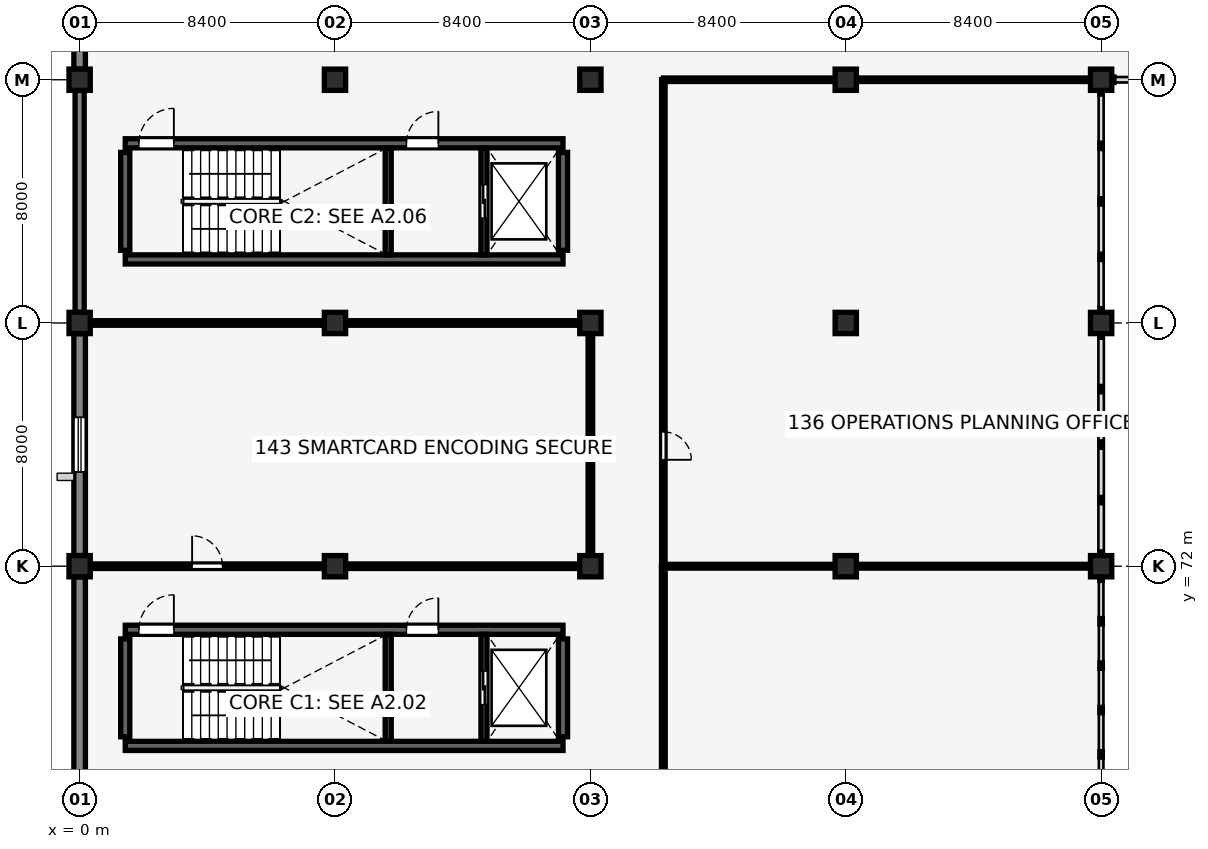
"""IFC4 building model, lengths in metres.
Left out: names, types, materials, properties, quantities, classifications, styles, units other than length and angle.
Written with IfcOpenShell. Run it as: python <this file> out.ifc"""

import sys

from ifc_helpers import new_model, si_unit, direction, frame, frame_2d, origin, origin_2d, place, context, subcontext, project, spatial, rectangle, extrude, element, fill, save


model = new_model("IFC4")
c1 = context("Model", 3, precision=1e-05, world=origin(), true_north=direction((0.0, 1.0)))
c2 = subcontext(c1, "Body", "Model", "MODEL_VIEW")
j1 = project(units=[si_unit("LENGTHUNIT", "METRE"), si_unit("PLANEANGLEUNIT", "RADIAN")], contexts=[c1])
p1 = place(None, origin())
s1 = spatial("IfcSite", under=j1, at=p1, CompositionType="ELEMENT")
p2 = place(p1, origin())
s2 = spatial("IfcBuilding", under=s1, at=p2, CompositionType="ELEMENT")
p3 = place(p2, frame((0.0, 0.0, 5.44)))
s3 = spatial("IfcBuildingStorey", under=s2, at=p3, CompositionType="ELEMENT", Elevation=5.44)
p4 = place(p3, frame((1.5, 66.09, 0.0), z_axis=(0.0, 0.0, 1.0), x_axis=(1.0, 0.0, 0.0)))
e1 = element("IfcWall", 1, at=p4, inside=s3, PredefinedType="SHEAR", context=c2, shape_type="SweptSolid", body=[
    extrude(rectangle(XDim=14.4, YDim=0.3, at=frame_2d((7.2, 0.0))), origin(), (0.0, 0.0, 1.0), 3.8),
])
p5 = place(p3, frame((1.5, 69.91, 0.0), z_axis=(0.0, 0.0, 1.0), x_axis=(1.0, 0.0, 0.0)))
e2 = element("IfcWall", 2, at=p5, inside=s3, PredefinedType="SHEAR", context=c2, shape_type="SweptSolid", body=[
    extrude(rectangle(XDim=14.4, YDim=0.3, at=frame_2d((7.2, 0.0))), origin(), (0.0, 0.0, 1.0), 3.8),
])
p6 = place(p5, frame((0.45, 0.0, 0.0), z_axis=(0.0, 0.0, 1.0), x_axis=(1.0, 0.0, 0.0)))
e3 = element("IfcOpeningElement", 3, at=p6, cuts=e2, PredefinedType="OPENING", context=c2, shape_type="SweptSolid", body=[
    extrude(rectangle(XDim=1.15, YDim=2.15, at=frame_2d((0.575, 1.075))), frame((0.0, 0.16, 0.0), z_axis=(0.0, -1.0, 0.0), x_axis=(1.0, 0.0, 0.0)), (0.0, 0.0, 1.0), 0.32),
])
p7 = place(p5, frame((9.25, 0.0, 0.0), z_axis=(0.0, 0.0, 1.0), x_axis=(1.0, 0.0, 0.0)))
e4 = element("IfcOpeningElement", 4, at=p7, cuts=e2, PredefinedType="OPENING", context=c2, shape_type="SweptSolid", body=[
    extrude(rectangle(XDim=1.05, YDim=2.15, at=frame_2d((0.525, 1.075))), frame((0.0, 0.16, 0.0), z_axis=(0.0, -1.0, 0.0), x_axis=(1.0, 0.0, 0.0)), (0.0, 0.0, 1.0), 0.32),
])
for number, where, z_axis, x_axis in (
    (5, (1.5, 66.39, 0.0), (0.0, 0.0, 1.0), (0.0, 1.0, 0.0)),
    (6, (15.9, 66.39, 0.0), (0.0, 0.0, 1.0), (0.0, 1.0, 0.0)),
):
    element("IfcWall", number, at=place(p3, frame(where, z_axis=z_axis, x_axis=x_axis)), inside=s3, PredefinedType="SHEAR", context=c2, shape_type="SweptSolid", body=[
        extrude(rectangle(XDim=3.22, YDim=0.3, at=frame_2d((1.61, 0.0))), origin(), (0.0, 0.0, 1.0), 3.8),
    ])
p8 = place(p3, frame((1.5, 82.09, 0.0), z_axis=(0.0, 0.0, 1.0), x_axis=(1.0, 0.0, 0.0)))
e7 = element("IfcWall", 7, at=p8, inside=s3, PredefinedType="SHEAR", context=c2, shape_type="SweptSolid", body=[
    extrude(rectangle(XDim=14.4, YDim=0.3, at=frame_2d((7.2, 0.0))), origin(), (0.0, 0.0, 1.0), 3.8),
])
p9 = place(p3, frame((1.5, 85.91, 0.0), z_axis=(0.0, 0.0, 1.0), x_axis=(1.0, 0.0, 0.0)))
e8 = element("IfcWall", 8, at=p9, inside=s3, PredefinedType="SHEAR", context=c2, shape_type="SweptSolid", body=[
    extrude(rectangle(XDim=14.4, YDim=0.3, at=frame_2d((7.2, 0.0))), origin(), (0.0, 0.0, 1.0), 3.8),
])
p10 = place(p9, frame((0.45, 0.0, 0.0), z_axis=(0.0, 0.0, 1.0), x_axis=(1.0, 0.0, 0.0)))
e9 = element("IfcOpeningElement", 9, at=p10, cuts=e8, PredefinedType="OPENING", context=c2, shape_type="SweptSolid", body=[
    extrude(rectangle(XDim=1.15, YDim=2.15, at=frame_2d((0.575, 1.075))), frame((0.0, 0.16, 0.0), z_axis=(0.0, -1.0, 0.0), x_axis=(1.0, 0.0, 0.0)), (0.0, 0.0, 1.0), 0.32),
])
p11 = place(p9, frame((9.25, 0.0, 0.0), z_axis=(0.0, 0.0, 1.0), x_axis=(1.0, 0.0, 0.0)))
e10 = element("IfcOpeningElement", 10, at=p11, cuts=e8, PredefinedType="OPENING", context=c2, shape_type="SweptSolid", body=[
    extrude(rectangle(XDim=1.05, YDim=2.15, at=frame_2d((0.525, 1.075))), frame((0.0, 0.16, 0.0), z_axis=(0.0, -1.0, 0.0), x_axis=(1.0, 0.0, 0.0)), (0.0, 0.0, 1.0), 0.32),
])
for number, where, z_axis, x_axis in (
    (11, (1.5, 82.39, 0.0), (0.0, 0.0, 1.0), (0.0, 1.0, 0.0)),
    (12, (15.9, 82.39, 0.0), (0.0, 0.0, 1.0), (0.0, 1.0, 0.0)),
):
    element("IfcWall", number, at=place(p3, frame(where, z_axis=z_axis, x_axis=x_axis)), inside=s3, PredefinedType="SHEAR", context=c2, shape_type="SweptSolid", body=[
        extrude(rectangle(XDim=3.22, YDim=0.3, at=frame_2d((1.61, 0.0))), origin(), (0.0, 0.0, 1.0), 3.8),
    ])
for number, where, z_axis, x_axis in (
    (13, (0.0, 72.0, 0.0), (0.0, 0.0, 1.0), (1.0, 0.0, 0.0)),
    (14, (0.0, 80.0, 0.0), (0.0, 0.0, 1.0), (1.0, 0.0, 0.0)),
    (15, (0.0, 88.0, 0.0), (0.0, 0.0, 1.0), (1.0, 0.0, 0.0)),
    (16, (8.4, 72.0, 0.0), (0.0, 0.0, 1.0), (1.0, 0.0, 0.0)),
    (17, (8.4, 80.0, 0.0), (0.0, 0.0, 1.0), (1.0, 0.0, 0.0)),
    (18, (8.4, 88.0, 0.0), (0.0, 0.0, 1.0), (1.0, 0.0, 0.0)),
    (19, (16.8, 72.0, 0.0), (0.0, 0.0, 1.0), (1.0, 0.0, 0.0)),
    (20, (16.8, 80.0, 0.0), (0.0, 0.0, 1.0), (1.0, 0.0, 0.0)),
    (21, (16.8, 88.0, 0.0), (0.0, 0.0, 1.0), (1.0, 0.0, 0.0)),
    (22, (25.2, 72.0, 0.0), (0.0, 0.0, 1.0), (1.0, 0.0, 0.0)),
    (23, (25.2, 80.0, 0.0), (0.0, 0.0, 1.0), (1.0, 0.0, 0.0)),
    (24, (25.2, 88.0, 0.0), (0.0, 0.0, 1.0), (1.0, 0.0, 0.0)),
    (25, (33.6, 72.0, 0.0), (0.0, 0.0, 1.0), (1.0, 0.0, 0.0)),
    (26, (33.6, 80.0, 0.0), (0.0, 0.0, 1.0), (1.0, 0.0, 0.0)),
    (27, (33.6, 88.0, 0.0), (0.0, 0.0, 1.0), (1.0, 0.0, 0.0)),
):
    element("IfcColumn", number, at=place(p3, frame(where, z_axis=z_axis, x_axis=x_axis)), inside=s3, PredefinedType="COLUMN", context=c2, shape_type="SweptSolid", body=[
        extrude(rectangle(XDim=0.7, YDim=0.7, at=origin_2d()), origin(), (0.0, 0.0, 1.0), 3.8),
    ])
p12 = place(p3, frame((0.0, 64.35, 0.0), z_axis=(0.0, 0.0, 1.0), x_axis=(0.0, 1.0, 0.0)))
e28 = element("IfcWall", 28, at=p12, inside=s3, PredefinedType="SOLIDWALL", context=c2, shape_type="SweptSolid", body=[
    extrude(rectangle(XDim=7.3, YDim=0.38, at=frame_2d((3.65, 0.0))), origin(), (0.0, 0.0, 1.0), 3.5),
])
p13 = place(p3, frame((0.0, 72.35, 0.0), z_axis=(0.0, 0.0, 1.0), x_axis=(0.0, 1.0, 0.0)))
e29 = element("IfcWall", 29, at=p13, inside=s3, PredefinedType="SOLIDWALL", context=c2, shape_type="SweptSolid", body=[
    extrude(rectangle(XDim=7.3, YDim=0.38, at=frame_2d((3.65, 0.0))), origin(), (0.0, 0.0, 1.0), 3.442),
])
p14 = place(p13, frame((2.75, 0.0, 0.9), z_axis=(0.0, 0.0, 1.0), x_axis=(1.0, 0.0, 0.0)))
e30 = element("IfcOpeningElement", 30, at=p14, cuts=e29, PredefinedType="OPENING", context=c2, shape_type="SweptSolid", body=[
    extrude(rectangle(XDim=1.8, YDim=1.45, at=frame_2d((0.9, 0.725))), frame((0.0, 0.2, 0.0), z_axis=(0.0, -1.0, 0.0), x_axis=(1.0, 0.0, 0.0)), (0.0, 0.0, 1.0), 0.4),
])
p15 = place(p3, frame((0.0, 80.35, 0.0), z_axis=(0.0, 0.0, 1.0), x_axis=(0.0, 1.0, 0.0)))
e31 = element("IfcWall", 31, at=p15, inside=s3, PredefinedType="SOLIDWALL", context=c2, shape_type="SweptSolid", body=[
    extrude(rectangle(XDim=7.3, YDim=0.3, at=frame_2d((3.65, 0.0))), origin(), (0.0, 0.0, 1.0), 3.5),
])
p16 = place(p3, frame((0.0, 88.35, 0.0), z_axis=(0.0, 0.0, 1.0), x_axis=(0.0, 1.0, 0.0)))
e32 = element("IfcWall", 32, at=p16, inside=s3, PredefinedType="SOLIDWALL", context=c2, shape_type="SweptSolid", body=[
    extrude(rectangle(XDim=7.3, YDim=0.38, at=frame_2d((3.65, 0.0))), origin(), (0.0, 0.0, 1.0), 3.442),
])
p17 = place(p16, frame((2.75, 0.0, 0.9), z_axis=(0.0, 0.0, 1.0), x_axis=(1.0, 0.0, 0.0)))
e33 = element("IfcOpeningElement", 33, at=p17, cuts=e32, PredefinedType="OPENING", context=c2, shape_type="SweptSolid", body=[
    extrude(rectangle(XDim=1.8, YDim=1.3, at=frame_2d((0.9, 0.65))), frame((0.0, 0.2, 0.0), z_axis=(0.0, -1.0, 0.0), x_axis=(1.0, 0.0, 0.0)), (0.0, 0.0, 1.0), 0.4),
])
p18 = place(p3, frame((10.15, 66.24, 0.0), z_axis=(0.0, 0.0, 1.0), x_axis=(0.0, 1.0, 0.0)))
e34 = element("IfcWall", 34, at=p18, inside=s3, PredefinedType="SHEAR", context=c2, shape_type="SweptSolid", body=[
    extrude(rectangle(XDim=3.52, YDim=0.2, at=frame_2d((1.76, 0.0))), origin(), (0.0, 0.0, 1.0), 3.8),
])
p19 = place(p3, frame((13.3, 66.24, 0.0), z_axis=(0.0, 0.0, 1.0), x_axis=(0.0, 1.0, 0.0)))
e35 = element("IfcWall", 35, at=p19, inside=s3, PredefinedType="SHEAR", context=c2, shape_type="SweptSolid", body=[
    extrude(rectangle(XDim=3.52, YDim=0.2, at=frame_2d((1.76, 0.0))), origin(), (0.0, 0.0, 1.0), 3.8),
])
p20 = place(p19, frame((1.21, 0.0, 0.0), z_axis=(0.0, 0.0, 1.0), x_axis=(1.0, 0.0, 0.0)))
e36 = element("IfcOpeningElement", 36, at=p20, cuts=e35, PredefinedType="OPENING", context=c2, shape_type="SweptSolid", body=[
    extrude(rectangle(XDim=1.1, YDim=2.15, at=frame_2d((0.55, 1.075))), frame((0.0, 0.11, 0.0), z_axis=(0.0, -1.0, 0.0), x_axis=(1.0, 0.0, 0.0)), (0.0, 0.0, 1.0), 0.22),
])
p21 = place(p3, frame((10.15, 82.24, 0.0), z_axis=(0.0, 0.0, 1.0), x_axis=(0.0, 1.0, 0.0)))
e37 = element("IfcWall", 37, at=p21, inside=s3, PredefinedType="SHEAR", context=c2, shape_type="SweptSolid", body=[
    extrude(rectangle(XDim=3.52, YDim=0.2, at=frame_2d((1.76, 0.0))), origin(), (0.0, 0.0, 1.0), 3.8),
])
p22 = place(p3, frame((13.3, 82.24, 0.0), z_axis=(0.0, 0.0, 1.0), x_axis=(0.0, 1.0, 0.0)))
e38 = element("IfcWall", 38, at=p22, inside=s3, PredefinedType="SHEAR", context=c2, shape_type="SweptSolid", body=[
    extrude(rectangle(XDim=3.52, YDim=0.2, at=frame_2d((1.76, 0.0))), origin(), (0.0, 0.0, 1.0), 3.8),
])
p23 = place(p22, frame((1.21, 0.0, 0.0), z_axis=(0.0, 0.0, 1.0), x_axis=(1.0, 0.0, 0.0)))
e39 = element("IfcOpeningElement", 39, at=p23, cuts=e38, PredefinedType="OPENING", context=c2, shape_type="SweptSolid", body=[
    extrude(rectangle(XDim=1.1, YDim=2.15, at=frame_2d((0.55, 1.075))), frame((0.0, 0.11, 0.0), z_axis=(0.0, -1.0, 0.0), x_axis=(1.0, 0.0, 0.0)), (0.0, 0.0, 1.0), 0.22),
])
p24 = place(p3, frame((0.34, 72.0, 0.0), z_axis=(0.0, 0.0, 1.0), x_axis=(1.0, 0.0, 0.0)))
e40 = element("IfcWall", 40, at=p24, inside=s3, PredefinedType="PARTITIONING", context=c2, shape_type="SweptSolid", body=[
    extrude(rectangle(XDim=7.72, YDim=0.15, at=frame_2d((3.86, 0.0))), origin(), (0.0, 0.0, 1.0), 3.26),
])
p25 = place(p24, frame((3.36, 0.0, 0.0), z_axis=(0.0, 0.0, 1.0), x_axis=(1.0, 0.0, 0.0)))
e41 = element("IfcOpeningElement", 41, at=p25, cuts=e40, PredefinedType="OPENING", context=c2, shape_type="SweptSolid", body=[
    extrude(rectangle(XDim=1.0, YDim=2.15, at=frame_2d((0.5, 1.075))), frame((0.0, 0.085, 0.0), z_axis=(0.0, -1.0, 0.0), x_axis=(1.0, 0.0, 0.0)), (0.0, 0.0, 1.0), 0.17),
])
p26 = place(p3, frame((19.2, 48.04, 0.0), z_axis=(0.0, 0.0, 1.0), x_axis=(0.0, 1.0, 0.0)))
e42 = element("IfcWall", 42, at=p26, inside=s3, PredefinedType="PARTITIONING", context=c2, shape_type="SweptSolid", body=[
    extrude(rectangle(XDim=23.96, YDim=0.125, at=frame_2d((11.98, 0.0))), origin(), (0.0, 0.0, 1.0), 3.8),
])
p27 = place(p26, frame((4.41, 0.0, 0.0), z_axis=(0.0, 0.0, 1.0), x_axis=(-1.0, 0.0, 0.0)))
e43 = element("IfcOpeningElement", 43, at=p27, cuts=e42, PredefinedType="OPENING", context=c2, shape_type="SweptSolid", body=[
    extrude(rectangle(XDim=0.95, YDim=2.15, at=frame_2d((0.475, 1.075))), frame((0.0, 0.073, 0.0), z_axis=(0.0, -1.0, 0.0), x_axis=(1.0, 0.0, 0.0)), (0.0, 0.0, 1.0), 0.145),
])
p28 = place(p3, frame((19.2, 72.0, 0.0), z_axis=(0.0, 0.0, 1.0), x_axis=(0.0, 1.0, 0.0)))
e44 = element("IfcWall", 44, at=p28, inside=s3, PredefinedType="PARTITIONING", context=c2, shape_type="SweptSolid", body=[
    extrude(rectangle(XDim=16.0, YDim=0.115, at=frame_2d((8.0, 0.0))), origin(), (0.0, 0.0, 1.0), 3.8),
])
p29 = place(p28, frame((4.42, 0.0, 0.0), z_axis=(0.0, 0.0, 1.0), x_axis=(-1.0, 0.0, 0.0)))
e45 = element("IfcOpeningElement", 45, at=p29, cuts=e44, PredefinedType="OPENING", context=c2, shape_type="SweptSolid", body=[
    extrude(rectangle(XDim=0.92, YDim=2.12, at=frame_2d((0.46, 1.06))), frame((0.0, 0.067, 0.0), z_axis=(0.0, -1.0, 0.0), x_axis=(1.0, 0.0, 0.0)), (0.0, 0.0, 1.0), 0.135),
])
for number, where, z_axis, x_axis in (
    (46, (8.74, 72.0, 0.0), (0.0, 0.0, 1.0), (1.0, 0.0, 0.0)),
    (47, (0.34, 80.0, 0.0), (0.0, 0.0, 1.0), (1.0, 0.0, 0.0)),
    (48, (8.74, 80.0, 0.0), (0.0, 0.0, 1.0), (1.0, 0.0, 0.0)),
):
    element("IfcWall", number, at=place(p3, frame(where, z_axis=z_axis, x_axis=x_axis)), inside=s3, PredefinedType="PARTITIONING", context=c2, shape_type="SweptSolid", body=[
        extrude(rectangle(XDim=7.72, YDim=0.15, at=frame_2d((3.86, 0.0))), origin(), (0.0, 0.0, 1.0), 3.26),
    ])
p30 = place(p3, frame((16.8, 72.34, 0.0), z_axis=(0.0, 0.0, 1.0), x_axis=(0.0, 1.0, 0.0)))
e49 = element("IfcWall", 49, at=p30, inside=s3, PredefinedType="PARTITIONING", context=c2, shape_type="SweptSolid", body=[
    extrude(rectangle(XDim=7.32, YDim=0.15, at=frame_2d((3.66, 0.0))), origin(), (0.0, 0.0, 1.0), 3.337),
])
p31 = place(p3, frame((19.2, 72.0, 0.0), z_axis=(0.0, 0.0, 1.0), x_axis=(1.0, 0.0, 0.0)))
e50 = element("IfcWall", 50, at=p31, inside=s3, PredefinedType="PARTITIONING", context=c2, shape_type="SweptSolid", body=[
    extrude(rectangle(XDim=5.66, YDim=0.125, at=frame_2d((2.83, 0.0))), origin(), (0.0, 0.0, 1.0), 3.26),
])
p32 = place(p3, frame((25.54, 72.0, 0.0), z_axis=(0.0, 0.0, 1.0), x_axis=(1.0, 0.0, 0.0)))
e51 = element("IfcWall", 51, at=p32, inside=s3, PredefinedType="PARTITIONING", context=c2, shape_type="SweptSolid", body=[
    extrude(rectangle(XDim=7.72, YDim=0.125, at=frame_2d((3.86, 0.0))), origin(), (0.0, 0.0, 1.0), 3.26),
])
p33 = place(p3, frame((19.2, 88.0, 0.0), z_axis=(0.0, 0.0, 1.0), x_axis=(1.0, 0.0, 0.0)))
e52 = element("IfcWall", 52, at=p33, inside=s3, PredefinedType="PARTITIONING", context=c2, shape_type="SweptSolid", body=[
    extrude(rectangle(XDim=5.66, YDim=0.115, at=frame_2d((2.83, 0.0))), origin(), (0.0, 0.0, 1.0), 3.26),
])
p34 = place(p3, frame((25.54, 88.0, 0.0), z_axis=(0.0, 0.0, 1.0), x_axis=(1.0, 0.0, 0.0)))
e53 = element("IfcWall", 53, at=p34, inside=s3, PredefinedType="PARTITIONING", context=c2, shape_type="SweptSolid", body=[
    extrude(rectangle(XDim=7.72, YDim=0.115, at=frame_2d((3.86, 0.0))), origin(), (0.0, 0.0, 1.0), 3.26),
])
p35 = place(p14, origin())
e54 = element("IfcWindow", 54, at=p35, inside=s3, PartitioningType="DOUBLE_PANEL_VERTICAL", PredefinedType="WINDOW", context=c2, shape_type="SweptSolid", body=[
    extrude(rectangle(XDim=1.8, YDim=1.45, at=frame_2d((0.9, 0.725))), frame((0.0, 0.03, 0.0), z_axis=(0.0, -1.0, 0.0), x_axis=(1.0, 0.0, 0.0)), (0.0, 0.0, 1.0), 0.06),
])
fill(e30, e54)
p36 = place(p6, origin())
e55 = element("IfcDoor", 55, at=p36, inside=s3, OperationType="SINGLE_SWING_RIGHT", PredefinedType="DOOR", context=c2, shape_type="SweptSolid", body=[
    extrude(rectangle(XDim=1.15, YDim=2.15, at=frame_2d((0.575, 1.075))), frame((0.0, 0.025, 0.0), z_axis=(0.0, -1.0, 0.0), x_axis=(1.0, 0.0, 0.0)), (0.0, 0.0, 1.0), 0.05),
])
fill(e3, e55)
p37 = place(p7, origin())
e56 = element("IfcDoor", 56, at=p37, inside=s3, OperationType="SINGLE_SWING_RIGHT", PredefinedType="DOOR", context=c2, shape_type="SweptSolid", body=[
    extrude(rectangle(XDim=1.05, YDim=2.15, at=frame_2d((0.525, 1.075))), frame((0.0, 0.025, 0.0), z_axis=(0.0, -1.0, 0.0), x_axis=(1.0, 0.0, 0.0)), (0.0, 0.0, 1.0), 0.05),
])
fill(e4, e56)
p38 = place(p20, origin())
e57 = element("IfcDoor", 57, at=p38, inside=s3, OperationType="DOUBLE_DOOR_SLIDING", PredefinedType="DOOR", context=c2, shape_type="SweptSolid", body=[
    extrude(rectangle(XDim=1.1, YDim=2.15, at=frame_2d((0.55, 1.075))), frame((0.0, 0.025, 0.0), z_axis=(0.0, -1.0, 0.0), x_axis=(1.0, 0.0, 0.0)), (0.0, 0.0, 1.0), 0.05),
])
fill(e36, e57)
p39 = place(p10, origin())
e58 = element("IfcDoor", 58, at=p39, inside=s3, OperationType="SINGLE_SWING_RIGHT", PredefinedType="DOOR", context=c2, shape_type="SweptSolid", body=[
    extrude(rectangle(XDim=1.15, YDim=2.15, at=frame_2d((0.575, 1.075))), frame((0.0, 0.025, 0.0), z_axis=(0.0, -1.0, 0.0), x_axis=(1.0, 0.0, 0.0)), (0.0, 0.0, 1.0), 0.05),
])
fill(e9, e58)
p40 = place(p11, origin())
e59 = element("IfcDoor", 59, at=p40, inside=s3, OperationType="SINGLE_SWING_RIGHT", PredefinedType="DOOR", context=c2, shape_type="SweptSolid", body=[
    extrude(rectangle(XDim=1.05, YDim=2.15, at=frame_2d((0.525, 1.075))), frame((0.0, 0.025, 0.0), z_axis=(0.0, -1.0, 0.0), x_axis=(1.0, 0.0, 0.0)), (0.0, 0.0, 1.0), 0.05),
])
fill(e10, e59)
p41 = place(p23, origin())
e60 = element("IfcDoor", 60, at=p41, inside=s3, OperationType="DOUBLE_DOOR_SLIDING", PredefinedType="DOOR", context=c2, shape_type="SweptSolid", body=[
    extrude(rectangle(XDim=1.1, YDim=2.15, at=frame_2d((0.55, 1.075))), frame((0.0, 0.025, 0.0), z_axis=(0.0, -1.0, 0.0), x_axis=(1.0, 0.0, 0.0)), (0.0, 0.0, 1.0), 0.05),
])
fill(e39, e60)
p42 = place(p25, origin())
e61 = element("IfcDoor", 61, at=p42, inside=s3, OperationType="SINGLE_SWING_LEFT", PredefinedType="DOOR", context=c2, shape_type="SweptSolid", body=[
    extrude(rectangle(XDim=1.0, YDim=2.15, at=frame_2d((0.5, 1.075))), frame((0.0, 0.025, 0.0), z_axis=(0.0, -1.0, 0.0), x_axis=(1.0, 0.0, 0.0)), (0.0, 0.0, 1.0), 0.05),
])
fill(e41, e61)
p43 = place(p29, origin())
e62 = element("IfcDoor", 62, at=p43, inside=s3, OperationType="SINGLE_SWING_RIGHT", PredefinedType="DOOR", context=c2, shape_type="SweptSolid", body=[
    extrude(rectangle(XDim=0.92, YDim=2.12, at=frame_2d((0.46, 1.06))), frame((0.0, 0.025, 0.0), z_axis=(0.0, -1.0, 0.0), x_axis=(1.0, 0.0, 0.0)), (0.0, 0.0, 1.0), 0.05),
])
fill(e45, e62)
save(model, sys.argv[1])
